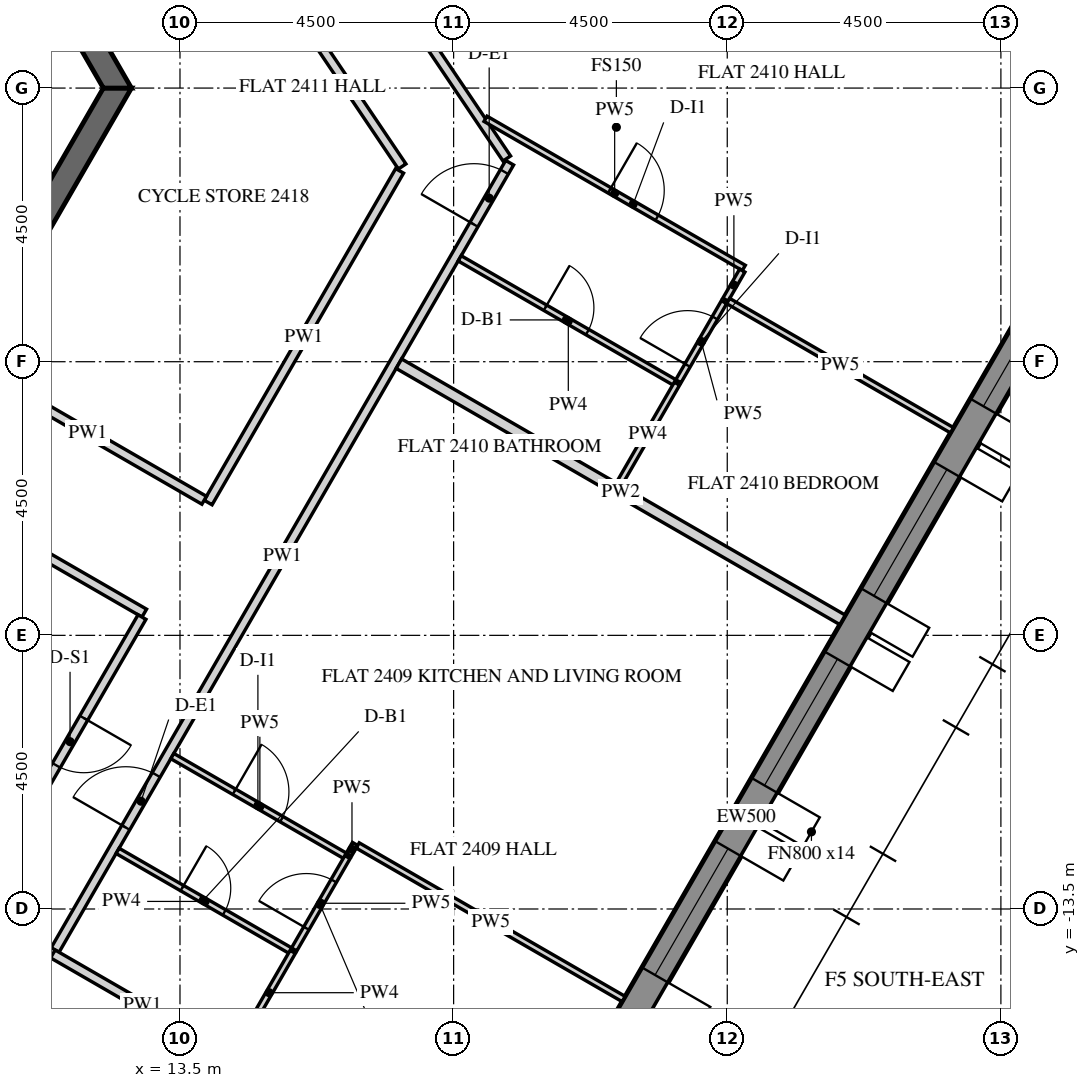
"""IFC4 building model, lengths in metres.
Left out: names, types, materials, properties, quantities, classifications, styles, units other than length and angle.
Written with IfcOpenShell. Run it as: python <this file> out.ifc"""

import sys

from ifc_helpers import new_model, si_unit, direction, frame, frame_2d, origin, place, context, subcontext, project, spatial, polyline, rectangle, outline, extrude, element, fill, save


model = new_model("IFC4")
c1 = context("Model", 3, precision=1e-05, world=origin(), true_north=direction((0.0, 1.0)))
c2 = subcontext(c1, "Body", "Model", "MODEL_VIEW")
j1 = project(units=[si_unit("LENGTHUNIT", "METRE"), si_unit("PLANEANGLEUNIT", "RADIAN")], contexts=[c1])
p1 = place(None, origin())
s1 = spatial("IfcSite", under=j1, at=p1, CompositionType="ELEMENT")
p2 = place(p1, origin())
s2 = spatial("IfcBuilding", under=s1, at=p2, CompositionType="ELEMENT")
p3 = place(p2, frame((0.0, 0.0, 303.0)))
s3 = spatial("IfcBuildingStorey", under=s2, at=p3, CompositionType="ELEMENT", Elevation=303.0)
p4 = place(p3, frame((16.451, -23.005, -0.15), z_axis=(0.0, 0.0, 1.0), x_axis=(0.500003737743, 0.866023245787, 0.0)))
e1 = element("IfcWall", 1, at=p4, inside=s3, PredefinedType="SOLIDWALL", context=c2, shape_type="SweptSolid", body=[
    extrude(outline(polyline([(-0.021, -0.25), (25.468, -0.25), (25.421, 0.25), (0.021, 0.25), (-0.021, -0.25)])), origin(), (0.0, 0.0, 1.0), 3.9),
])
p5 = place(p4, frame((2.522, 0.0, 0.75)))
e2 = element("IfcOpeningElement", 2, at=p5, cuts=e1, PredefinedType="OPENING", context=c2, shape_type="SweptSolid", body=[
    extrude(rectangle(XDim=2.4, YDim=2.7, at=frame_2d((1.2, 1.35))), frame((0.0, 0.26, 0.0), z_axis=(0.0, -1.0, 0.0), x_axis=(1.0, 0.0, 0.0)), (0.0, 0.0, 1.0), 0.52),
])
p6 = place(p4, frame((6.122, 0.0, 0.75)))
e3 = element("IfcOpeningElement", 3, at=p6, cuts=e1, PredefinedType="OPENING", context=c2, shape_type="SweptSolid", body=[
    extrude(rectangle(XDim=2.4, YDim=2.7, at=frame_2d((1.2, 1.35))), frame((0.0, 0.26, 0.0), z_axis=(0.0, -1.0, 0.0), x_axis=(1.0, 0.0, 0.0)), (0.0, 0.0, 1.0), 0.52),
])
p7 = place(p4, frame((9.722, 0.0, 0.75)))
e4 = element("IfcOpeningElement", 4, at=p7, cuts=e1, PredefinedType="OPENING", context=c2, shape_type="SweptSolid", body=[
    extrude(rectangle(XDim=2.4, YDim=2.7, at=frame_2d((1.2, 1.35))), frame((0.0, 0.26, 0.0), z_axis=(0.0, -1.0, 0.0), x_axis=(1.0, 0.0, 0.0)), (0.0, 0.0, 1.0), 0.52),
])
p8 = place(p4, frame((13.323, 0.0, 0.75)))
e5 = element("IfcOpeningElement", 5, at=p8, cuts=e1, PredefinedType="OPENING", context=c2, shape_type="SweptSolid", body=[
    extrude(rectangle(XDim=2.4, YDim=2.7, at=frame_2d((1.2, 1.35))), frame((0.0, 0.26, 0.0), z_axis=(0.0, -1.0, 0.0), x_axis=(1.0, 0.0, 0.0)), (0.0, 0.0, 1.0), 0.52),
])
p9 = place(p4, frame((16.922, 0.0, 0.75)))
e6 = element("IfcOpeningElement", 6, at=p9, cuts=e1, PredefinedType="OPENING", context=c2, shape_type="SweptSolid", body=[
    extrude(rectangle(XDim=2.4, YDim=2.7, at=frame_2d((1.2, 1.35))), frame((0.0, 0.26, 0.0), z_axis=(0.0, -1.0, 0.0), x_axis=(1.0, 0.0, 0.0)), (0.0, 0.0, 1.0), 0.52),
])
p10 = place(p4, frame((20.522, 0.0, 0.75)))
e7 = element("IfcOpeningElement", 7, at=p10, cuts=e1, PredefinedType="OPENING", context=c2, shape_type="SweptSolid", body=[
    extrude(rectangle(XDim=2.4, YDim=2.7, at=frame_2d((1.2, 1.35))), frame((0.0, 0.26, 0.0), z_axis=(0.0, -1.0, 0.0), x_axis=(1.0, 0.0, 0.0)), (0.0, 0.0, 1.0), 0.52),
])
p11 = place(p3, frame((6.235, -10.8, -0.15), z_axis=(0.0, 0.0, 1.0), x_axis=(0.499996419489, 0.866027470984, 0.0)))
e8 = element("IfcWall", 8, at=p11, inside=s3, PredefinedType="SHEAR", context=c2, shape_type="SweptSolid", body=[
    extrude(outline(polyline([(-0.115, -0.2), (12.586, -0.2), (12.355, 0.2), (0.115, 0.2), (-0.115, -0.2)])), origin(), (0.0, 0.0, 1.0), 3.9),
])
p12 = place(p11, frame((5.364, 0.0, 0.15)))
e9 = element("IfcOpeningElement", 9, at=p12, cuts=e8, PredefinedType="OPENING", context=c2, shape_type="SweptSolid", body=[
    extrude(rectangle(XDim=1.8, YDim=2.4, at=frame_2d((0.9, 1.2))), frame((0.0, 0.21, 0.0), z_axis=(0.0, -1.0, 0.0), x_axis=(1.0, 0.0, 0.0)), (0.0, 0.0, 1.0), 0.42),
])
p13 = place(p3, frame((12.471, 0.0, -0.15), z_axis=(0.0, 0.0, 1.0), x_axis=(-0.499996419489, 0.866027470984, 0.0)))
e10 = element("IfcWall", 10, at=p13, inside=s3, PredefinedType="SHEAR", context=c2, shape_type="SweptSolid", body=[
    extrude(outline(polyline([(-0.115, -0.2), (12.586, -0.2), (12.355, 0.2), (0.115, 0.2), (-0.115, -0.2)])), origin(), (0.0, 0.0, 1.0), 3.9),
])
p14 = place(p13, frame((5.306, 0.0, 0.15)))
e11 = element("IfcOpeningElement", 11, at=p14, cuts=e10, PredefinedType="OPENING", context=c2, shape_type="SweptSolid", body=[
    extrude(rectangle(XDim=1.8, YDim=2.4, at=frame_2d((0.9, 1.2))), frame((0.0, 0.21, 0.0), z_axis=(0.0, -1.0, 0.0), x_axis=(1.0, 0.0, 0.0)), (0.0, 0.0, 1.0), 0.42),
])
p15 = place(p3, frame((6.351, -11.0, -0.15), z_axis=(0.0, 0.0, 1.0), x_axis=(0.499998894578, -0.866026041999, 0.0)))
e12 = element("IfcWall", 12, at=p15, inside=s3, PredefinedType="SHEAR", context=c2, shape_type="SweptSolid", body=[
    extrude(rectangle(XDim=15.544, YDim=0.4, at=frame_2d((7.772, 0.0))), origin(), (0.0, 0.0, 1.0), 3.9),
])
p16 = place(p15, frame((6.872, 0.0, 0.15)))
e13 = element("IfcOpeningElement", 13, at=p16, cuts=e12, PredefinedType="OPENING", context=c2, shape_type="SweptSolid", body=[
    extrude(rectangle(XDim=1.8, YDim=2.4, at=frame_2d((0.9, 1.2))), frame((0.0, 0.21, 0.0), z_axis=(0.0, -1.0, 0.0), x_axis=(1.0, 0.0, 0.0)), (0.0, 0.0, 1.0), 0.42),
])
p17 = place(p3, frame((11.447, -14.174, 0.0), z_axis=(0.0, 0.0, 1.0), x_axis=(0.500003306199, 0.866023494941, 0.0)))
e14 = element("IfcWall", 14, at=p17, inside=s3, PredefinedType="PARTITIONING", context=c2, shape_type="SweptSolid", body=[
    extrude(rectangle(XDim=14.949, YDim=0.15, at=frame_2d((7.475, 0.0))), origin(), (0.0, 0.0, 1.0), 2.988),
])
p18 = place(p17, frame((2.325, 0.0, 0.0)))
e15 = element("IfcOpeningElement", 15, at=p18, cuts=e14, PredefinedType="OPENING", context=c2, shape_type="SweptSolid", body=[
    extrude(rectangle(XDim=1.0, YDim=2.1, at=frame_2d((0.5, 1.05))), frame((0.0, 0.085, 0.0), z_axis=(0.0, -1.0, 0.0), x_axis=(1.0, 0.0, 0.0)), (0.0, 0.0, 1.0), 0.17),
])
p19 = place(p17, frame((13.776, 0.0, 0.0)))
e16 = element("IfcOpeningElement", 16, at=p19, cuts=e14, PredefinedType="OPENING", context=c2, shape_type="SweptSolid", body=[
    extrude(rectangle(XDim=1.0, YDim=2.1, at=frame_2d((0.5, 1.05))), frame((0.0, 0.085, 0.0), z_axis=(0.0, -1.0, 0.0), x_axis=(1.0, 0.0, 0.0)), (0.0, 0.0, 1.0), 0.17),
])
p20 = place(p3, frame((14.354, -15.939, 0.0), z_axis=(0.0, 0.0, 1.0), x_axis=(-0.866020560687, 0.500008388397, 0.0)))
e17 = element("IfcWall", 17, at=p20, inside=s3, PredefinedType="PARTITIONING", context=c2, shape_type="SweptSolid", body=[
    extrude(rectangle(XDim=3.4, YDim=0.15, at=frame_2d((1.7, 0.0))), origin(), (0.0, 0.0, 1.0), 2.988),
])
p21 = place(p3, frame((18.875, -1.158, 0.0), z_axis=(0.0, 0.0, 1.0), x_axis=(-0.55919880344, 0.829033592945, 0.0)))
e18 = element("IfcWall", 18, at=p21, inside=s3, PredefinedType="PARTITIONING", context=c2, shape_type="SweptSolid", body=[
    extrude(rectangle(XDim=16.939, YDim=0.15, at=frame_2d((8.47, 0.0))), origin(), (0.0, 0.0, 1.0), 2.988),
])
p22 = place(p21, frame((4.09, 0.0, 0.0)))
e19 = element("IfcOpeningElement", 19, at=p22, cuts=e18, PredefinedType="OPENING", context=c2, shape_type="SweptSolid", body=[
    extrude(rectangle(XDim=1.0, YDim=2.1, at=frame_2d((0.5, 1.05))), frame((0.0, 0.085, 0.0), z_axis=(0.0, -1.0, 0.0), x_axis=(1.0, 0.0, 0.0)), (0.0, 0.0, 1.0), 0.17),
])
p23 = place(p21, frame((15.39, 0.0, 0.0)))
e20 = element("IfcOpeningElement", 20, at=p23, cuts=e18, PredefinedType="OPENING", context=c2, shape_type="SweptSolid", body=[
    extrude(rectangle(XDim=1.0, YDim=2.1, at=frame_2d((0.5, 1.05))), frame((0.0, 0.085, 0.0), z_axis=(0.0, -1.0, 0.0), x_axis=(1.0, 0.0, 0.0)), (0.0, 0.0, 1.0), 0.17),
])
p24 = place(p3, frame((12.367, 5.808, 0.0), z_axis=(0.0, 0.0, 1.0), x_axis=(0.559187256666, -0.829041381345, 0.0)))
e21 = element("IfcWall", 21, at=p24, inside=s3, PredefinedType="PARTITIONING", context=c2, shape_type="SweptSolid", body=[
    extrude(rectangle(XDim=8.56, YDim=0.15, at=frame_2d((4.28, 0.0))), origin(), (0.0, 0.0, 1.0), 2.988),
])
p25 = place(p24, frame((3.83, 0.0, 0.0)))
e22 = element("IfcOpeningElement", 22, at=p25, cuts=e21, PredefinedType="OPENING", context=c2, shape_type="SweptSolid", body=[
    extrude(rectangle(XDim=0.9, YDim=2.1, at=frame_2d((0.45, 1.05))), frame((0.0, 0.085, 0.0), z_axis=(0.0, -1.0, 0.0), x_axis=(1.0, 0.0, 0.0)), (0.0, 0.0, 1.0), 0.17),
])
p26 = place(p3, frame((17.112, -1.362, 0.0), z_axis=(0.0, 0.0, 1.0), x_axis=(-0.49999985423, -0.866025487945, 0.0)))
e23 = element("IfcWall", 23, at=p26, inside=s3, PredefinedType="PARTITIONING", context=c2, shape_type="SweptSolid", body=[
    extrude(rectangle(XDim=6.298, YDim=0.15, at=frame_2d((3.149, 0.0))), origin(), (0.0, 0.0, 1.0), 2.988),
])
p27 = place(p3, frame((13.898, -6.778, 0.0), z_axis=(0.0, 0.0, 1.0), x_axis=(-0.866041342403, 0.499972392486, 0.0)))
e24 = element("IfcWall", 24, at=p27, inside=s3, PredefinedType="PARTITIONING", context=c2, shape_type="SweptSolid", body=[
    extrude(rectangle(XDim=4.425, YDim=0.15, at=frame_2d((2.212, 0.0))), origin(), (0.0, 0.0, 1.0), 2.988),
])
p28 = place(p3, frame((9.016, -6.384, 0.0), z_axis=(0.0, 0.0, 1.0), x_axis=(0.866031096941, -0.499990139034, 0.0)))
e25 = element("IfcWall", 25, at=p28, inside=s3, PredefinedType="PARTITIONING", context=c2, shape_type="SweptSolid", body=[
    extrude(rectangle(XDim=4.5, YDim=0.15, at=frame_2d((2.25, 0.0))), origin(), (0.0, 0.0, 1.0), 2.988),
])
p29 = place(p3, frame((12.875, -8.699, 0.0), z_axis=(0.0, 0.0, 1.0), x_axis=(-0.49999482868, -0.866028389427, 0.0)))
e26 = element("IfcWall", 26, at=p29, inside=s3, PredefinedType="PARTITIONING", context=c2, shape_type="SweptSolid", body=[
    extrude(rectangle(XDim=4.733, YDim=0.15, at=frame_2d((2.366, 0.0))), origin(), (0.0, 0.0, 1.0), 2.988),
])
p30 = place(p29, frame((1.917, 0.0, 0.0)))
e27 = element("IfcOpeningElement", 27, at=p30, cuts=e26, PredefinedType="OPENING", context=c2, shape_type="SweptSolid", body=[
    extrude(rectangle(XDim=0.9, YDim=2.1, at=frame_2d((0.45, 1.05))), frame((0.0, 0.085, 0.0), z_axis=(0.0, -1.0, 0.0), x_axis=(1.0, 0.0, 0.0)), (0.0, 0.0, 1.0), 0.17),
])
p31 = place(p3, frame((13.374, -10.985, 0.0), z_axis=(0.0, 0.0, 1.0), x_axis=(0.866020521143, -0.500008456887, 0.0)))
e28 = element("IfcWall", 28, at=p31, inside=s3, PredefinedType="PARTITIONING", context=c2, shape_type="SweptSolid", body=[
    extrude(rectangle(XDim=3.325, YDim=0.1, at=frame_2d((1.663, 0.0))), origin(), (0.0, 0.0, 1.0), 2.988),
])
p32 = place(p31, frame((1.175, 0.0, 0.0)))
e29 = element("IfcOpeningElement", 29, at=p32, cuts=e28, PredefinedType="OPENING", context=c2, shape_type="SweptSolid", body=[
    extrude(rectangle(XDim=0.9, YDim=2.1, at=frame_2d((0.45, 1.05))), frame((0.0, 0.06, 0.0), z_axis=(0.0, -1.0, 0.0), x_axis=(1.0, 0.0, 0.0)), (0.0, 0.0, 1.0), 0.12),
])
p33 = place(p3, frame((16.278, -12.606, 0.0), z_axis=(0.0, 0.0, 1.0), x_axis=(0.500137716533, 0.865945878506, 0.0)))
e30 = element("IfcWall", 30, at=p33, inside=s3, PredefinedType="PARTITIONING", context=c2, shape_type="SweptSolid", body=[
    extrude(rectangle(XDim=0.204, YDim=0.1, at=frame_2d((0.102, 0.0))), origin(), (0.0, 0.0, 1.0), 2.988),
])
p34 = place(p3, frame((16.423, -12.455, 0.0), z_axis=(0.0, 0.0, 1.0), x_axis=(0.866018134068, -0.500012591307, 0.0)))
e31 = element("IfcWall", 31, at=p34, inside=s3, PredefinedType="PARTITIONING", context=c2, shape_type="SweptSolid", body=[
    extrude(rectangle(XDim=5.05, YDim=0.1, at=frame_2d((2.525, 0.0))), origin(), (0.0, 0.0, 1.0), 2.988),
])
p35 = place(p3, frame((24.396, -8.745, 0.0), z_axis=(0.0, 0.0, 1.0), x_axis=(-0.866014270972, 0.500019282102, 0.0)))
e32 = element("IfcWall", 32, at=p35, inside=s3, PredefinedType="PARTITIONING", context=c2, shape_type="SweptSolid", body=[
    extrude(rectangle(XDim=8.425, YDim=0.18, at=frame_2d((4.212, 0.0))), origin(), (0.0, 0.0, 1.0), 2.988),
])
p36 = place(p3, frame((12.474, -12.544, 0.0), z_axis=(0.0, 0.0, 1.0), x_axis=(0.866002163101, -0.500040251884, 0.0)))
e33 = element("IfcWall", 33, at=p36, inside=s3, PredefinedType="PARTITIONING", context=c2, shape_type="SweptSolid", body=[
    extrude(rectangle(XDim=3.325, YDim=0.1, at=frame_2d((1.663, 0.0))), origin(), (0.0, 0.0, 1.0), 2.988),
])
p37 = place(p36, frame((1.225, 0.0, 0.0)))
e34 = element("IfcOpeningElement", 34, at=p37, cuts=e33, PredefinedType="OPENING", context=c2, shape_type="SweptSolid", body=[
    extrude(rectangle(XDim=0.8, YDim=2.1, at=frame_2d((0.4, 1.05))), frame((0.0, 0.06, 0.0), z_axis=(0.0, -1.0, 0.0), x_axis=(1.0, 0.0, 0.0)), (0.0, 0.0, 1.0), 0.12),
])
p38 = place(p3, frame((15.378, -14.165, 0.0), z_axis=(0.0, 0.0, 1.0), x_axis=(0.499971461383, 0.866041879935, 0.0)))
e35 = element("IfcWall", 35, at=p38, inside=s3, PredefinedType="PARTITIONING", context=c2, shape_type="SweptSolid", body=[
    extrude(rectangle(XDim=1.754, YDim=0.1, at=frame_2d((0.877, 0.0))), origin(), (0.0, 0.0, 1.0), 2.988),
])
p39 = place(p38, frame((0.402, 0.0, 0.0)))
e36 = element("IfcOpeningElement", 36, at=p39, cuts=e35, PredefinedType="OPENING", context=c2, shape_type="SweptSolid", body=[
    extrude(rectangle(XDim=0.9, YDim=2.1, at=frame_2d((0.45, 1.05))), frame((0.0, 0.06, 0.0), z_axis=(0.0, -1.0, 0.0), x_axis=(1.0, 0.0, 0.0)), (0.0, 0.0, 1.0), 0.12),
])
p40 = place(p3, frame((14.579, -15.548, 0.0), z_axis=(0.0, 0.0, 1.0), x_axis=(0.499949632511, 0.866054481515, 0.0)))
e37 = element("IfcWall", 37, at=p40, inside=s3, PredefinedType="PARTITIONING", context=c2, shape_type="SweptSolid", body=[
    extrude(rectangle(XDim=1.551, YDim=0.1, at=frame_2d((0.775, 0.0))), origin(), (0.0, 0.0, 1.0), 2.988),
])
p41 = place(p3, frame((18.524, -0.505, 0.0), z_axis=(0.0, 0.0, 1.0), x_axis=(0.866032243237, -0.499988153533, 0.0)))
e38 = element("IfcWall", 38, at=p41, inside=s3, PredefinedType="PARTITIONING", context=c2, shape_type="SweptSolid", body=[
    extrude(rectangle(XDim=4.905, YDim=0.1, at=frame_2d((2.452, 0.0))), origin(), (0.0, 0.0, 1.0), 2.988),
])
p42 = place(p41, frame((2.355, 0.0, 0.0)))
e39 = element("IfcOpeningElement", 39, at=p42, cuts=e38, PredefinedType="OPENING", context=c2, shape_type="SweptSolid", body=[
    extrude(rectangle(XDim=0.9, YDim=2.1, at=frame_2d((0.45, 1.05))), frame((0.0, 0.06, 0.0), z_axis=(0.0, -1.0, 0.0), x_axis=(1.0, 0.0, 0.0)), (0.0, 0.0, 1.0), 0.12),
])
p43 = place(p3, frame((22.747, -3.001, 0.0), z_axis=(0.0, 0.0, 1.0), x_axis=(-0.499850094852, -0.866111934265, 0.0)))
e40 = element("IfcWall", 40, at=p43, inside=s3, PredefinedType="PARTITIONING", context=c2, shape_type="SweptSolid", body=[
    extrude(rectangle(XDim=0.552, YDim=0.1, at=frame_2d((0.276, 0.0))), origin(), (0.0, 0.0, 1.0), 2.988),
])
p44 = place(p3, frame((22.515, -3.502, 0.0), z_axis=(0.0, 0.0, 1.0), x_axis=(0.866028703517, -0.499994284652, 0.0)))
e41 = element("IfcWall", 41, at=p44, inside=s3, PredefinedType="PARTITIONING", context=c2, shape_type="SweptSolid", body=[
    extrude(rectangle(XDim=4.25, YDim=0.1, at=frame_2d((2.125, 0.0))), origin(), (0.0, 0.0, 1.0), 2.988),
])
p45 = place(p3, frame((18.1, -2.8, 0.0), z_axis=(0.0, 0.0, 1.0), x_axis=(0.866019999656, -0.500009360108, 0.0)))
e42 = element("IfcWall", 42, at=p45, inside=s3, PredefinedType="PARTITIONING", context=c2, shape_type="SweptSolid", body=[
    extrude(rectangle(XDim=4.125, YDim=0.1, at=frame_2d((2.062, 0.0))), origin(), (0.0, 0.0, 1.0), 2.988),
])
p46 = place(p45, frame((1.625, 0.0, 0.0)))
e43 = element("IfcOpeningElement", 43, at=p46, cuts=e42, PredefinedType="OPENING", context=c2, shape_type="SweptSolid", body=[
    extrude(rectangle(XDim=0.8, YDim=2.1, at=frame_2d((0.4, 1.05))), frame((0.0, 0.06, 0.0), z_axis=(0.0, -1.0, 0.0), x_axis=(1.0, 0.0, 0.0)), (0.0, 0.0, 1.0), 0.12),
])
p47 = place(p3, frame((21.696, -4.821, 0.0), z_axis=(0.0, 0.0, 1.0), x_axis=(0.499985098601, 0.86603400694, 0.0)))
e44 = element("IfcWall", 44, at=p47, inside=s3, PredefinedType="PARTITIONING", context=c2, shape_type="SweptSolid", body=[
    extrude(rectangle(XDim=1.502, YDim=0.1, at=frame_2d((0.751, 0.0))), origin(), (0.0, 0.0, 1.0), 2.988),
])
p48 = place(p47, frame((0.302, 0.0, 0.0)))
e45 = element("IfcOpeningElement", 45, at=p48, cuts=e44, PredefinedType="OPENING", context=c2, shape_type="SweptSolid", body=[
    extrude(rectangle(XDim=0.9, YDim=2.1, at=frame_2d((0.45, 1.05))), frame((0.0, 0.06, 0.0), z_axis=(0.0, -1.0, 0.0), x_axis=(1.0, 0.0, 0.0)), (0.0, 0.0, 1.0), 0.12),
])
p49 = place(p3, frame((20.717, -6.517, 0.0), z_axis=(0.0, 0.0, 1.0), x_axis=(0.500039310002, 0.866002706955, 0.0)))
e46 = element("IfcWall", 46, at=p49, inside=s3, PredefinedType="PARTITIONING", context=c2, shape_type="SweptSolid", body=[
    extrude(rectangle(XDim=1.912, YDim=0.1, at=frame_2d((0.956, 0.0))), origin(), (0.0, 0.0, 1.0), 2.988),
])
p50 = place(p7, frame((0.0, 0.18, 0.0)))
e47 = element("IfcWindow", 47, at=p50, inside=s3, PartitioningType="DOUBLE_PANEL_VERTICAL", PredefinedType="WINDOW", context=c2, shape_type="SweptSolid", body=[
    extrude(rectangle(XDim=2.4, YDim=2.7, at=frame_2d((1.2, 1.35))), frame((0.0, 0.03, 0.0), z_axis=(0.0, -1.0, 0.0), x_axis=(1.0, 0.0, 0.0)), (0.0, 0.0, 1.0), 0.06),
])
fill(e4, e47)
p51 = place(p8, frame((0.0, 0.18, 0.0)))
e48 = element("IfcWindow", 48, at=p51, inside=s3, PartitioningType="DOUBLE_PANEL_VERTICAL", PredefinedType="WINDOW", context=c2, shape_type="SweptSolid", body=[
    extrude(rectangle(XDim=2.4, YDim=2.7, at=frame_2d((1.2, 1.35))), frame((0.0, 0.03, 0.0), z_axis=(0.0, -1.0, 0.0), x_axis=(1.0, 0.0, 0.0)), (0.0, 0.0, 1.0), 0.06),
])
fill(e5, e48)
p52 = place(p9, frame((0.0, 0.18, 0.0)))
e49 = element("IfcWindow", 49, at=p52, inside=s3, PartitioningType="DOUBLE_PANEL_VERTICAL", PredefinedType="WINDOW", context=c2, shape_type="SweptSolid", body=[
    extrude(rectangle(XDim=2.4, YDim=2.7, at=frame_2d((1.2, 1.35))), frame((0.0, 0.03, 0.0), z_axis=(0.0, -1.0, 0.0), x_axis=(1.0, 0.0, 0.0)), (0.0, 0.0, 1.0), 0.06),
])
fill(e6, e49)
p53 = place(p10, frame((0.0, 0.18, 0.0)))
e50 = element("IfcWindow", 50, at=p53, inside=s3, PartitioningType="DOUBLE_PANEL_VERTICAL", PredefinedType="WINDOW", context=c2, shape_type="SweptSolid", body=[
    extrude(rectangle(XDim=2.4, YDim=2.7, at=frame_2d((1.2, 1.35))), frame((0.0, 0.03, 0.0), z_axis=(0.0, -1.0, 0.0), x_axis=(1.0, 0.0, 0.0)), (0.0, 0.0, 1.0), 0.06),
])
fill(e7, e50)
p54 = place(p18, origin())
e51 = element("IfcDoor", 51, at=p54, inside=s3, OperationType="SINGLE_SWING_LEFT", PredefinedType="DOOR", context=c2, shape_type="SweptSolid", body=[
    extrude(rectangle(XDim=1.0, YDim=2.1, at=frame_2d((0.5, 1.05))), frame((0.0, 0.025, 0.0), z_axis=(0.0, -1.0, 0.0), x_axis=(1.0, 0.0, 0.0)), (0.0, 0.0, 1.0), 0.05),
])
fill(e15, e51)
p55 = place(p37, origin())
e52 = element("IfcDoor", 52, at=p55, inside=s3, OperationType="SINGLE_SWING_RIGHT", PredefinedType="DOOR", context=c2, shape_type="SweptSolid", body=[
    extrude(rectangle(XDim=0.8, YDim=2.1, at=frame_2d((0.4, 1.05))), frame((0.0, 0.025, 0.0), z_axis=(0.0, -1.0, 0.0), x_axis=(1.0, 0.0, 0.0)), (0.0, 0.0, 1.0), 0.05),
])
fill(e34, e52)
p56 = place(p32, origin())
e53 = element("IfcDoor", 53, at=p56, inside=s3, OperationType="SINGLE_SWING_RIGHT", PredefinedType="DOOR", context=c2, shape_type="SweptSolid", body=[
    extrude(rectangle(XDim=0.9, YDim=2.1, at=frame_2d((0.45, 1.05))), frame((0.0, 0.025, 0.0), z_axis=(0.0, -1.0, 0.0), x_axis=(1.0, 0.0, 0.0)), (0.0, 0.0, 1.0), 0.05),
])
fill(e29, e53)
p57 = place(p39, origin())
e54 = element("IfcDoor", 54, at=p57, inside=s3, OperationType="SINGLE_SWING_RIGHT", PredefinedType="DOOR", context=c2, shape_type="SweptSolid", body=[
    extrude(rectangle(XDim=0.9, YDim=2.1, at=frame_2d((0.45, 1.05))), frame((0.0, 0.025, 0.0), z_axis=(0.0, -1.0, 0.0), x_axis=(1.0, 0.0, 0.0)), (0.0, 0.0, 1.0), 0.05),
])
fill(e36, e54)
p58 = place(p19, origin())
e55 = element("IfcDoor", 55, at=p58, inside=s3, OperationType="SINGLE_SWING_LEFT", PredefinedType="DOOR", context=c2, shape_type="SweptSolid", body=[
    extrude(rectangle(XDim=1.0, YDim=2.1, at=frame_2d((0.5, 1.05))), frame((0.0, 0.025, 0.0), z_axis=(0.0, -1.0, 0.0), x_axis=(1.0, 0.0, 0.0)), (0.0, 0.0, 1.0), 0.05),
])
fill(e16, e55)
p59 = place(p46, origin())
e56 = element("IfcDoor", 56, at=p59, inside=s3, OperationType="SINGLE_SWING_RIGHT", PredefinedType="DOOR", context=c2, shape_type="SweptSolid", body=[
    extrude(rectangle(XDim=0.8, YDim=2.1, at=frame_2d((0.4, 1.05))), frame((0.0, 0.025, 0.0), z_axis=(0.0, -1.0, 0.0), x_axis=(1.0, 0.0, 0.0)), (0.0, 0.0, 1.0), 0.05),
])
fill(e43, e56)
p60 = place(p42, origin())
e57 = element("IfcDoor", 57, at=p60, inside=s3, OperationType="SINGLE_SWING_LEFT", PredefinedType="DOOR", context=c2, shape_type="SweptSolid", body=[
    extrude(rectangle(XDim=0.9, YDim=2.1, at=frame_2d((0.45, 1.05))), frame((0.0, 0.025, 0.0), z_axis=(0.0, -1.0, 0.0), x_axis=(1.0, 0.0, 0.0)), (0.0, 0.0, 1.0), 0.05),
])
fill(e39, e57)
p61 = place(p48, origin())
e58 = element("IfcDoor", 58, at=p61, inside=s3, OperationType="SINGLE_SWING_LEFT", PredefinedType="DOOR", context=c2, shape_type="SweptSolid", body=[
    extrude(rectangle(XDim=0.9, YDim=2.1, at=frame_2d((0.45, 1.05))), frame((0.0, 0.025, 0.0), z_axis=(0.0, -1.0, 0.0), x_axis=(1.0, 0.0, 0.0)), (0.0, 0.0, 1.0), 0.05),
])
fill(e45, e58)
p62 = place(p30, origin())
e59 = element("IfcDoor", 59, at=p62, inside=s3, OperationType="SINGLE_SWING_LEFT", PredefinedType="DOOR", context=c2, shape_type="SweptSolid", body=[
    extrude(rectangle(XDim=0.9, YDim=2.1, at=frame_2d((0.45, 1.05))), frame((0.0, 0.025, 0.0), z_axis=(0.0, -1.0, 0.0), x_axis=(1.0, 0.0, 0.0)), (0.0, 0.0, 1.0), 0.05),
])
fill(e27, e59)
save(model, sys.argv[1])
